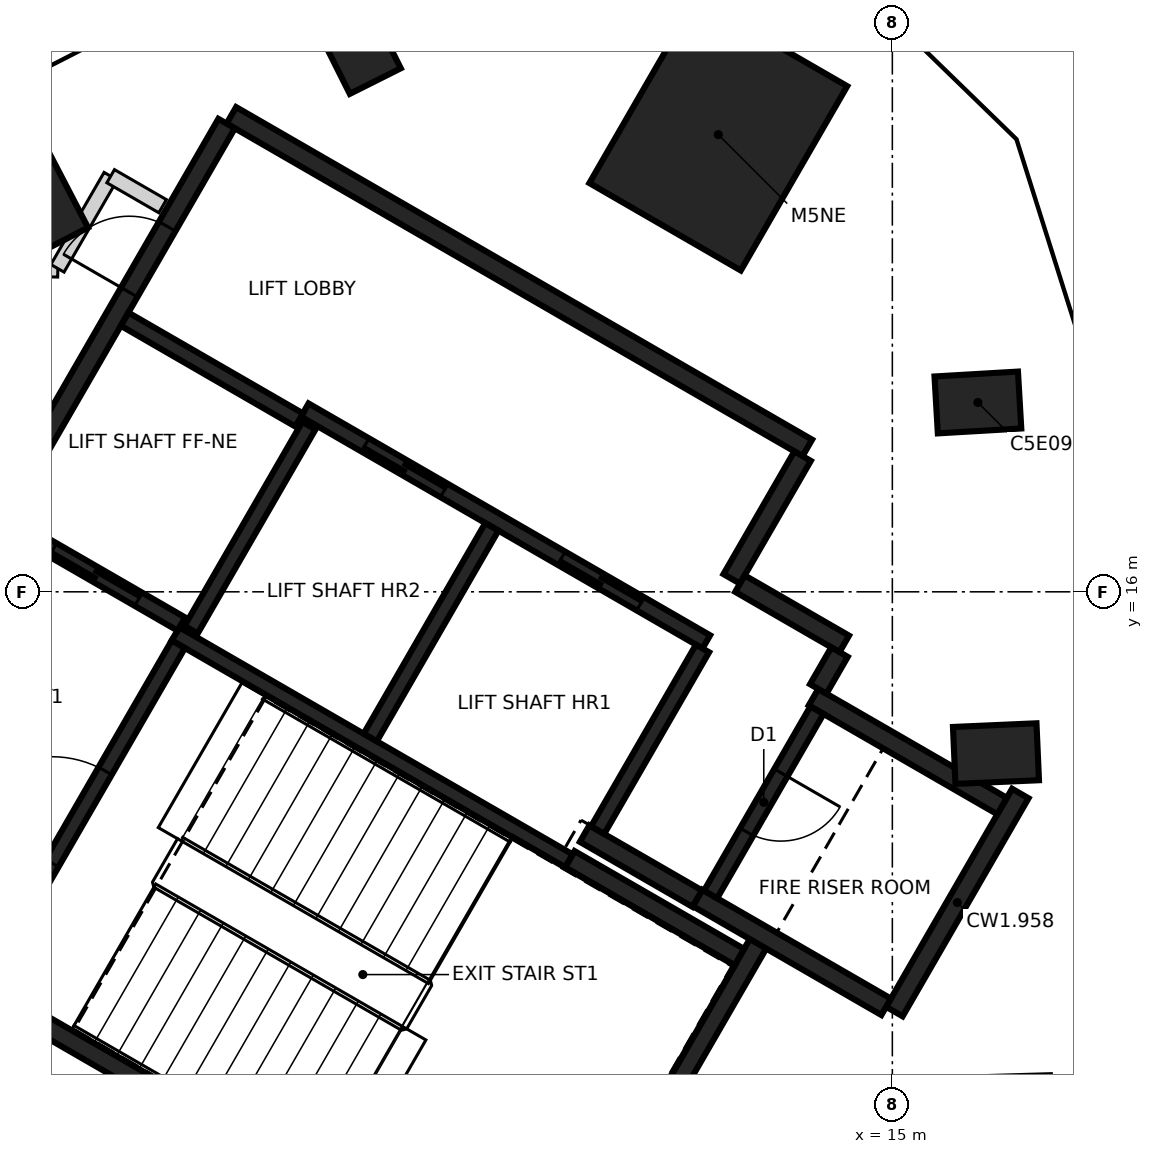
"""IFC4 building model, lengths in metres.
Left out: names, types, materials, properties, quantities, classifications, styles, units other than length and angle.
Written with IfcOpenShell. Run it as: python <this file> out.ifc"""

import sys

from ifc_helpers import new_model, si_unit, direction, frame, frame_2d, origin, origin_2d, place, context, subcontext, project, spatial, rectangle, extrude, element, fill, save


model = new_model("IFC4")
c1 = context("Model", 3, precision=1e-05, world=origin(), true_north=direction((0.0, 1.0)))
c2 = subcontext(c1, "Body", "Model", "MODEL_VIEW")
j1 = project(units=[si_unit("LENGTHUNIT", "METRE"), si_unit("PLANEANGLEUNIT", "RADIAN")], contexts=[c1])
p1 = place(None, origin())
s1 = spatial("IfcSite", under=j1, at=p1, CompositionType="ELEMENT")
p2 = place(p1, origin())
s2 = spatial("IfcBuilding", under=s1, at=p2, CompositionType="ELEMENT")
p3 = place(p2, frame((0.0, 0.0, 250.2)))
s3 = spatial("IfcBuildingStorey", under=s2, at=p3, CompositionType="ELEMENT", Elevation=250.2)
for number, where, z_axis, x_axis in (
    (1, (16.363, 13.872, -0.35), (0.0, 0.0, 1.0), (0.999, 0.044, 0.0)),
    (2, (16.125, 18.491, -0.35), (0.0, 0.0, 1.0), (0.998, 0.058, 0.0)),
    (3, (7.951, 23.211, -0.35), (0.0, 0.0, 1.0), (-0.449, 0.894, 0.0)),
    (4, (3.832, 21.107, -0.35), (0.0, 0.0, 1.0), (-0.461, 0.887, 0.0)),
):
    element("IfcColumn", number, at=place(p3, frame(where, z_axis=z_axis, x_axis=x_axis)), inside=s3, PredefinedType="COLUMN", context=c2, shape_type="SweptSolid", body=[
        extrude(rectangle(XDim=1.1, YDim=0.75, at=origin_2d()), origin(), (0.0, 0.0, 1.0), 3.6),
    ])
p4 = place(p3, frame((12.71, 22.015, -0.35), z_axis=(0.0, 0.0, 1.0), x_axis=(0.5, 0.866025403784, 0.0)))
e5 = element("IfcColumn", 5, at=p4, inside=s3, PredefinedType="COLUMN", context=c2, shape_type="SweptSolid", body=[
    extrude(rectangle(XDim=2.8, YDim=2.3, at=origin_2d()), origin(), (0.0, 0.0, 1.0), 3.6),
])
p5 = place(p3, frame((10.42, 6.498, 0.0), z_axis=(0.0, 0.0, 1.0), x_axis=(-0.866021906294, 0.500006057782, 0.0)))
e6 = element("IfcWall", 6, at=p5, inside=s3, PredefinedType="SHEAR", context=c2, shape_type="SweptSolid", body=[
    extrude(rectangle(XDim=11.55, YDim=0.25, at=frame_2d((5.775, 0.0))), origin(), (0.0, 0.0, 1.0), 3.25),
])
p6 = place(p5, frame((10.025, 0.0, 0.0)))
e7 = element("IfcOpeningElement", 7, at=p6, cuts=e6, PredefinedType="OPENING", context=c2, shape_type="SweptSolid", body=[
    extrude(rectangle(XDim=1.2, YDim=2.1, at=frame_2d((0.6, 1.05))), frame((0.0, 0.135, 0.0), z_axis=(0.0, -1.0, 0.0), x_axis=(1.0, 0.0, 0.0)), (0.0, 0.0, 1.0), 0.27),
])
p7 = place(p5, frame((8.725, 0.0, 0.0)))
e8 = element("IfcOpeningElement", 8, at=p7, cuts=e6, PredefinedType="OPENING", context=c2, shape_type="SweptSolid", body=[
    extrude(rectangle(XDim=1.2, YDim=2.1, at=frame_2d((0.6, 1.05))), frame((0.0, 0.135, 0.0), z_axis=(0.0, -1.0, 0.0), x_axis=(1.0, 0.0, 0.0)), (0.0, 0.0, 1.0), 0.27),
])
p8 = place(p3, frame((6.304, 22.269, 0.0), z_axis=(0.0, 0.0, 1.0), x_axis=(0.866022959057, -0.500004234368, 0.0)))
e9 = element("IfcWall", 9, at=p8, inside=s3, PredefinedType="SHEAR", context=c2, shape_type="SweptSolid", body=[
    extrude(rectangle(XDim=8.75, YDim=0.25, at=frame_2d((4.375, 0.0))), origin(), (0.0, 0.0, 1.0), 3.25),
])
p9 = place(p3, frame((3.179, 16.856, 0.0), z_axis=(0.0, 0.0, 1.0), x_axis=(0.500001955336, 0.866024274868, 0.0)))
e10 = element("IfcWall", 10, at=p9, inside=s3, PredefinedType="SHEAR", context=c2, shape_type="SweptSolid", body=[
    extrude(rectangle(XDim=6.125, YDim=0.25, at=frame_2d((3.062, 0.0))), origin(), (0.0, 0.0, 1.0), 3.25),
])
p10 = place(p9, frame((3.563, 0.0, 0.0)))
e11 = element("IfcOpeningElement", 11, at=p10, cuts=e10, PredefinedType="OPENING", context=c2, shape_type="SweptSolid", body=[
    extrude(rectangle(XDim=1.0, YDim=2.1, at=frame_2d((0.5, 1.05))), frame((0.0, 0.135, 0.0), z_axis=(0.0, -1.0, 0.0), x_axis=(1.0, 0.0, 0.0)), (0.0, 0.0, 1.0), 0.27),
])
p11 = place(p3, frame((13.238, 11.378, 0.0), z_axis=(0.0, 0.0, 1.0), x_axis=(-0.500008851346, -0.866020293397, 0.0)))
e12 = element("IfcWall", 12, at=p11, inside=s3, PredefinedType="SHEAR", context=c2, shape_type="SweptSolid", body=[
    extrude(rectangle(XDim=5.51, YDim=0.25, at=frame_2d((2.755, 0.0))), origin(), (0.0, 0.0, 1.0), 3.25),
])
p12 = place(p3, frame((16.684, 13.347, 0.0), z_axis=(0.0, 0.0, 1.0), x_axis=(-0.499998874531, -0.866026053573, 0.0)))
e13 = element("IfcWall", 13, at=p12, inside=s3, PredefinedType="SHEAR", context=c2, shape_type="SweptSolid", body=[
    extrude(rectangle(XDim=3.313, YDim=0.25, at=frame_2d((1.656, 0.0))), origin(), (0.0, 0.0, 1.0), 3.25),
])
p13 = place(p3, frame((14.918, 10.54, 0.0), z_axis=(0.0, 0.0, 1.0), x_axis=(-0.866063538972, 0.499933942099, 0.0)))
e14 = element("IfcWall", 14, at=p13, inside=s3, PredefinedType="SHEAR", context=c2, shape_type="SweptSolid", body=[
    extrude(rectangle(XDim=2.865, YDim=0.25, at=frame_2d((1.432, 0.0))), origin(), (0.0, 0.0, 1.0), 3.25),
])
p14 = place(p3, frame((13.963, 14.614, 0.0), z_axis=(0.0, 0.0, 1.0), x_axis=(0.866042235819, -0.499970844928, 0.0)))
e15 = element("IfcWall", 15, at=p14, inside=s3, PredefinedType="SHEAR", context=c2, shape_type="SweptSolid", body=[
    extrude(rectangle(XDim=2.865, YDim=0.25, at=frame_2d((1.432, 0.0))), origin(), (0.0, 0.0, 1.0), 3.25),
])
p15 = place(p3, frame((10.757, 12.481, 0.0), z_axis=(0.0, 0.0, 1.0), x_axis=(0.866022940537, -0.500004266446, 0.0)))
e16 = element("IfcWall", 16, at=p15, inside=s3, PredefinedType="SHEAR", context=c2, shape_type="SweptSolid", body=[
    extrude(rectangle(XDim=2.575, YDim=0.25, at=frame_2d((1.287, 0.0))), origin(), (0.0, 0.0, 1.0), 3.25),
])
p16 = place(p3, frame((13.819, 17.785, 0.0), z_axis=(0.0, 0.0, 1.0), x_axis=(-0.500039802285, -0.866002422705, 0.0)))
e17 = element("IfcWall", 17, at=p16, inside=s3, PredefinedType="SHEAR", context=c2, shape_type="SweptSolid", body=[
    extrude(rectangle(XDim=1.865, YDim=0.25, at=frame_2d((0.932, 0.0))), origin(), (0.0, 0.0, 1.0), 3.25),
])
p17 = place(p3, frame((12.433, 11.964, 0.0), z_axis=(0.0, 0.0, 1.0), x_axis=(-0.866038183914, 0.499977863513, 0.0)))
e18 = element("IfcWall", 18, at=p17, inside=s3, PredefinedType="SHEAR", context=c2, shape_type="SweptSolid", body=[
    extrude(rectangle(XDim=1.71, YDim=0.25, at=frame_2d((0.855, 0.0))), origin(), (0.0, 0.0, 1.0), 3.25),
])
p18 = place(p3, frame((12.995, 16.108, 0.0), z_axis=(0.0, 0.0, 1.0), x_axis=(0.866044474677, -0.49996696679, 0.0)))
e19 = element("IfcWall", 19, at=p18, inside=s3, PredefinedType="SHEAR", context=c2, shape_type="SweptSolid", body=[
    extrude(rectangle(XDim=1.584, YDim=0.25, at=frame_2d((0.792, 0.0))), origin(), (0.0, 0.0, 1.0), 3.25),
])
p19 = place(p3, frame((14.305, 15.207, 0.0), z_axis=(0.0, 0.0, 1.0), x_axis=(-0.499848422343, -0.866112899501, 0.0)))
e20 = element("IfcWall", 20, at=p19, inside=s3, PredefinedType="SHEAR", context=c2, shape_type="SweptSolid", body=[
    extrude(rectangle(XDim=0.559, YDim=0.25, at=frame_2d((0.28, 0.0))), origin(), (0.0, 0.0, 1.0), 3.25),
])
p20 = place(p3, frame((12.552, 15.342, 0.0), z_axis=(0.0, 0.0, 1.0), x_axis=(-0.866030299012, 0.499991521122, 0.0)))
e21 = element("IfcWall", 21, at=p20, inside=s3, PredefinedType="SHEAR", context=c2, shape_type="SweptSolid", body=[
    extrude(rectangle(XDim=6.1, YDim=0.2, at=frame_2d((3.05, 0.0))), origin(), (0.0, 0.0, 1.0), 3.25),
])
p21 = place(p20, frame((1.0, 0.0, 0.0)))
e22 = element("IfcOpeningElement", 22, at=p21, cuts=e21, PredefinedType="OPENING", context=c2, shape_type="SweptSolid", body=[
    extrude(rectangle(XDim=1.2, YDim=2.1, at=frame_2d((0.6, 1.05))), frame((0.0, 0.11, 0.0), z_axis=(0.0, -1.0, 0.0), x_axis=(1.0, 0.0, 0.0)), (0.0, 0.0, 1.0), 0.22),
])
p22 = place(p20, frame((3.982, 0.0, 0.0)))
e23 = element("IfcOpeningElement", 23, at=p22, cuts=e21, PredefinedType="OPENING", context=c2, shape_type="SweptSolid", body=[
    extrude(rectangle(XDim=1.2, YDim=2.1, at=frame_2d((0.6, 1.05))), frame((0.0, 0.11, 0.0), z_axis=(0.0, -1.0, 0.0), x_axis=(1.0, 0.0, 0.0)), (0.0, 0.0, 1.0), 0.22),
])
p23 = place(p3, frame((10.743, 12.46, 0.0), z_axis=(0.0, 0.0, 1.0), x_axis=(-0.866018848283, 0.500011354289, 0.0)))
e24 = element("IfcWall", 24, at=p23, inside=s3, PredefinedType="SHEAR", context=c2, shape_type="SweptSolid", body=[
    extrude(rectangle(XDim=5.974, YDim=0.2, at=frame_2d((2.987, 0.0))), origin(), (0.0, 0.0, 1.0), 3.25),
])
p24 = place(p3, frame((3.057, 10.895, 0.0), z_axis=(0.0, 0.0, 1.0), x_axis=(0.500027839223, 0.866009330205, 0.0)))
e25 = element("IfcWall", 25, at=p24, inside=s3, PredefinedType="SHEAR", context=c2, shape_type="SweptSolid", body=[
    extrude(rectangle(XDim=5.098, YDim=0.2, at=frame_2d((2.549, 0.0))), origin(), (0.0, 0.0, 1.0), 3.25),
])
p25 = place(p24, frame((1.774, 0.0, 0.0)))
e26 = element("IfcOpeningElement", 26, at=p25, cuts=e25, PredefinedType="OPENING", context=c2, shape_type="SweptSolid", body=[
    extrude(rectangle(XDim=1.4, YDim=2.1, at=frame_2d((0.7, 1.05))), frame((0.0, 0.11, 0.0), z_axis=(0.0, -1.0, 0.0), x_axis=(1.0, 0.0, 0.0)), (0.0, 0.0, 1.0), 0.22),
])
p26 = place(p3, frame((8.132, 14.084, 0.0), z_axis=(0.0, 0.0, 1.0), x_axis=(0.500030834389, 0.86600760081, 0.0)))
e27 = element("IfcWall", 27, at=p26, inside=s3, PredefinedType="SHEAR", context=c2, shape_type="SweptSolid", body=[
    extrude(rectangle(XDim=3.198, YDim=0.2, at=frame_2d((1.599, 0.0))), origin(), (0.0, 0.0, 1.0), 3.25),
])
p27 = place(p3, frame((14.008, 14.442, 0.0), z_axis=(0.0, 0.0, 1.0), x_axis=(-0.499986818241, -0.866033014143, 0.0)))
e28 = element("IfcWall", 28, at=p27, inside=s3, PredefinedType="SHEAR", context=c2, shape_type="SweptSolid", body=[
    extrude(rectangle(XDim=2.798, YDim=0.2, at=frame_2d((1.399, 0.0))), origin(), (0.0, 0.0, 1.0), 3.25),
])
p28 = place(p27, frame((0.949, 0.0, 0.0)))
e29 = element("IfcOpeningElement", 29, at=p28, cuts=e28, PredefinedType="OPENING", context=c2, shape_type="SweptSolid", body=[
    extrude(rectangle(XDim=0.9, YDim=2.1, at=frame_2d((0.45, 1.05))), frame((0.0, 0.11, 0.0), z_axis=(0.0, -1.0, 0.0), x_axis=(1.0, 0.0, 0.0)), (0.0, 0.0, 1.0), 0.22),
])
p29 = place(p3, frame((12.502, 15.255, 0.0), z_axis=(0.0, 0.0, 1.0), x_axis=(-0.499965018551, -0.866045599391, 0.0)))
e30 = element("IfcWall", 30, at=p29, inside=s3, PredefinedType="SHEAR", context=c2, shape_type="SweptSolid", body=[
    extrude(rectangle(XDim=2.759, YDim=0.2, at=frame_2d((1.379, 0.0))), origin(), (0.0, 0.0, 1.0), 3.25),
])
p30 = place(p3, frame((7.324, 18.187, 0.0), z_axis=(0.0, 0.0, 1.0), x_axis=(-0.499967891604, -0.866043940782, 0.0)))
e31 = element("IfcWall", 31, at=p30, inside=s3, PredefinedType="SHEAR", context=c2, shape_type="SweptSolid", body=[
    extrude(rectangle(XDim=3.1, YDim=0.2, at=frame_2d((1.55, 0.0))), origin(), (0.0, 0.0, 1.0), 3.25),
])
p31 = place(p3, frame((5.646, 15.576, 0.0), z_axis=(0.0, 0.0, 1.0), x_axis=(-0.866018407898, 0.500012117035, 0.0)))
e32 = element("IfcWall", 32, at=p31, inside=s3, PredefinedType="SHEAR", context=c2, shape_type="SweptSolid", body=[
    extrude(rectangle(XDim=2.651, YDim=0.2, at=frame_2d((1.325, 0.0))), origin(), (0.0, 0.0, 1.0), 3.25),
])
p32 = place(p31, frame((0.652, 0.0, 0.0)))
e33 = element("IfcOpeningElement", 33, at=p32, cuts=e32, PredefinedType="OPENING", context=c2, shape_type="SweptSolid", body=[
    extrude(rectangle(XDim=1.3, YDim=2.1, at=frame_2d((0.65, 1.05))), frame((0.0, 0.11, 0.0), z_axis=(0.0, -1.0, 0.0), x_axis=(1.0, 0.0, 0.0)), (0.0, 0.0, 1.0), 0.22),
])
p33 = place(p3, frame((7.196, 18.26, 0.0), z_axis=(0.0, 0.0, 1.0), x_axis=(-0.866018407898, 0.500012117035, 0.0)))
e34 = element("IfcWall", 34, at=p33, inside=s3, PredefinedType="SHEAR", context=c2, shape_type="SweptSolid", body=[
    extrude(rectangle(XDim=2.651, YDim=0.2, at=frame_2d((1.325, 0.0))), origin(), (0.0, 0.0, 1.0), 3.25),
])
p34 = place(p3, frame((3.219, 20.256, 0.0), z_axis=(0.0, 0.0, 1.0), x_axis=(0.999821939894, -0.018870307541, 0.0)))
e35 = element("IfcWall", 35, at=p34, inside=s3, PredefinedType="PARTITIONING", context=c2, shape_type="SweptSolid", body=[
    extrude(rectangle(XDim=0.802, YDim=0.2, at=frame_2d((0.401, 0.0))), origin(), (0.0, 0.0, 1.0), 3.25),
])
p35 = place(p3, frame((4.016, 20.256, 0.0), z_axis=(0.0, 0.0, 1.0), x_axis=(0.500135180047, 0.865947343479, 0.0)))
e36 = element("IfcWall", 36, at=p35, inside=s3, PredefinedType="PARTITIONING", context=c2, shape_type="SweptSolid", body=[
    extrude(rectangle(XDim=1.399, YDim=0.2, at=frame_2d((0.7, 0.0))), origin(), (0.0, 0.0, 1.0), 2.35),
])
p36 = place(p3, frame((4.716, 21.468, 0.0), z_axis=(0.0, 0.0, 1.0), x_axis=(0.865912682783, -0.500195187698, 0.0)))
e37 = element("IfcWall", 37, at=p36, inside=s3, PredefinedType="PARTITIONING", context=c2, shape_type="SweptSolid", body=[
    extrude(rectangle(XDim=0.79, YDim=0.2, at=frame_2d((0.395, 0.0))), origin(), (0.0, 0.0, 1.0), 2.35),
])
p37 = place(p3, frame((3.046, 22.466, 0.0), z_axis=(0.0, 0.0, 1.0), x_axis=(0.500078449558, -0.865980106173, 0.0)))
e38 = element("IfcWall", 38, at=p37, inside=s3, PredefinedType="PARTITIONING", context=c2, shape_type="SweptSolid", body=[
    extrude(rectangle(XDim=1.9, YDim=0.2, at=frame_2d((0.95, 0.0))), origin(), (0.0, 0.0, 1.0), 3.25),
])
p38 = place(p32, origin())
e39 = element("IfcDoor", 39, at=p38, inside=s3, OperationType="SLIDING_TO_RIGHT", PredefinedType="DOOR", context=c2, shape_type="SweptSolid", body=[
    extrude(rectangle(XDim=1.3, YDim=2.1, at=frame_2d((0.65, 1.05))), frame((0.0, 0.025, 0.0), z_axis=(0.0, -1.0, 0.0), x_axis=(1.0, 0.0, 0.0)), (0.0, 0.0, 1.0), 0.05),
])
fill(e33, e39)
p39 = place(p21, origin())
e40 = element("IfcDoor", 40, at=p39, inside=s3, OperationType="DOUBLE_DOOR_SLIDING", PredefinedType="DOOR", context=c2, shape_type="SweptSolid", body=[
    extrude(rectangle(XDim=1.2, YDim=2.1, at=frame_2d((0.6, 1.05))), frame((0.0, 0.025, 0.0), z_axis=(0.0, -1.0, 0.0), x_axis=(1.0, 0.0, 0.0)), (0.0, 0.0, 1.0), 0.05),
])
fill(e22, e40)
p40 = place(p22, origin())
e41 = element("IfcDoor", 41, at=p40, inside=s3, OperationType="DOUBLE_DOOR_SLIDING", PredefinedType="DOOR", context=c2, shape_type="SweptSolid", body=[
    extrude(rectangle(XDim=1.2, YDim=2.1, at=frame_2d((0.6, 1.05))), frame((0.0, 0.025, 0.0), z_axis=(0.0, -1.0, 0.0), x_axis=(1.0, 0.0, 0.0)), (0.0, 0.0, 1.0), 0.05),
])
fill(e23, e41)
p41 = place(p10, origin())
e42 = element("IfcDoor", 42, at=p41, inside=s3, OperationType="SINGLE_SWING_LEFT", PredefinedType="DOOR", context=c2, shape_type="SweptSolid", body=[
    extrude(rectangle(XDim=1.0, YDim=2.1, at=frame_2d((0.5, 1.05))), frame((0.0, 0.025, 0.0), z_axis=(0.0, -1.0, 0.0), x_axis=(1.0, 0.0, 0.0)), (0.0, 0.0, 1.0), 0.05),
])
fill(e11, e42)
p42 = place(p25, origin())
e43 = element("IfcDoor", 43, at=p42, inside=s3, OperationType="SINGLE_SWING_RIGHT", PredefinedType="DOOR", context=c2, shape_type="SweptSolid", body=[
    extrude(rectangle(XDim=1.4, YDim=2.1, at=frame_2d((0.7, 1.05))), frame((0.0, 0.025, 0.0), z_axis=(0.0, -1.0, 0.0), x_axis=(1.0, 0.0, 0.0)), (0.0, 0.0, 1.0), 0.05),
])
fill(e26, e43)
p43 = place(p28, origin())
e44 = element("IfcDoor", 44, at=p43, inside=s3, OperationType="SINGLE_SWING_LEFT", PredefinedType="DOOR", context=c2, shape_type="SweptSolid", body=[
    extrude(rectangle(XDim=0.9, YDim=2.1, at=frame_2d((0.45, 1.05))), frame((0.0, 0.025, 0.0), z_axis=(0.0, -1.0, 0.0), x_axis=(1.0, 0.0, 0.0)), (0.0, 0.0, 1.0), 0.05),
])
fill(e29, e44)
save(model, sys.argv[1])
